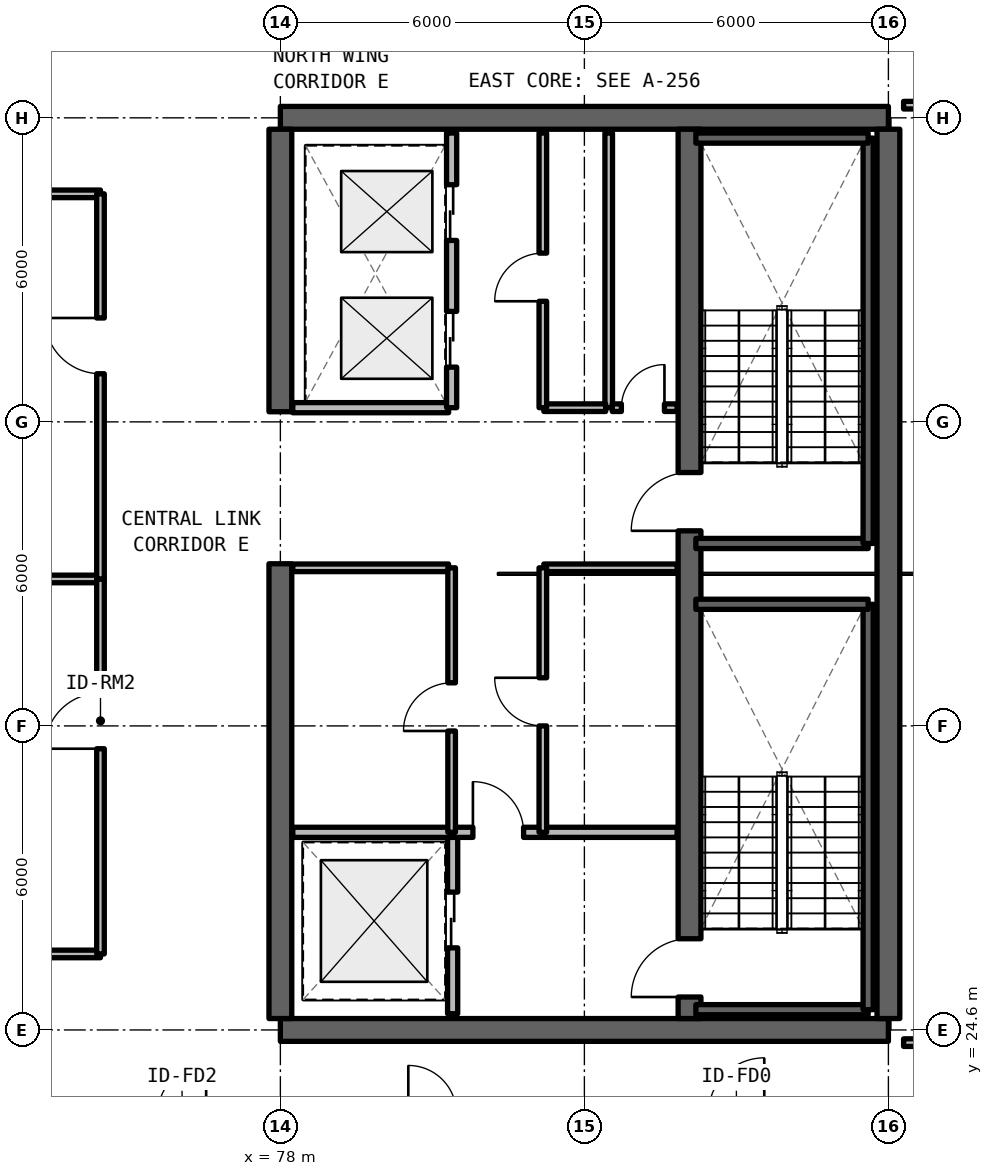
"""IFC4 building model, lengths in metres.
Left out: names, types, materials, properties, quantities, classifications, styles, units other than length and angle.
Written with IfcOpenShell. Run it as: python <this file> out.ifc"""

import sys

from ifc_helpers import new_model, si_unit, direction, frame, frame_2d, origin, place, context, subcontext, project, spatial, rectangle, extrude, element, fill, save


model = new_model("IFC4")
c1 = context("Model", 3, precision=1e-05, world=origin(), true_north=direction((0.0, 1.0)))
c2 = subcontext(c1, "Body", "Model", "MODEL_VIEW")
j1 = project(units=[si_unit("LENGTHUNIT", "METRE"), si_unit("PLANEANGLEUNIT", "RADIAN")], contexts=[c1])
p1 = place(None, origin())
s1 = spatial("IfcSite", under=j1, at=p1, CompositionType="ELEMENT")
p2 = place(p1, origin())
s2 = spatial("IfcBuilding", under=s1, at=p2, CompositionType="ELEMENT")
p3 = place(p2, frame((0.0, 0.0, 242.55)))
s3 = spatial("IfcBuildingStorey", under=s2, at=p3, CompositionType="ELEMENT", Elevation=242.55)
for number, where, z_axis, x_axis in (
    (1, (78.0, 24.6, 0.0), (0.0, 0.0, 1.0), (1.0, 0.0, 0.0)),
    (2, (90.0, 42.6, 0.0), (0.0, 0.0, 1.0), (-1.0, 0.0, 0.0)),
):
    element("IfcWall", number, at=place(p3, frame(where, z_axis=z_axis, x_axis=x_axis)), inside=s3, PredefinedType="SHEAR", context=c2, shape_type="SweptSolid", body=[
        extrude(rectangle(XDim=12.0, YDim=0.45, at=frame_2d((6.0, 0.0))), origin(), (0.0, 0.0, 1.0), 3.63),
    ])
p4 = place(p3, frame((90.0, 24.825, 0.0), z_axis=(0.0, 0.0, 1.0), x_axis=(0.0, 1.0, 0.0)))
e3 = element("IfcWall", 3, at=p4, inside=s3, PredefinedType="SHEAR", context=c2, shape_type="SweptSolid", body=[
    extrude(rectangle(XDim=17.55, YDim=0.45, at=frame_2d((8.775, 0.0))), origin(), (0.0, 0.0, 1.0), 3.63),
])
p5 = place(p3, frame((78.0, 24.825, 0.0), z_axis=(0.0, 0.0, 1.0), x_axis=(0.0, 1.0, 0.0)))
e4 = element("IfcWall", 4, at=p5, inside=s3, PredefinedType="SHEAR", context=c2, shape_type="SweptSolid", body=[
    extrude(rectangle(XDim=8.975, YDim=0.45, at=frame_2d((4.488, 0.0))), origin(), (0.0, 0.0, 1.0), 3.63),
])
p6 = place(p3, frame((78.0, 36.8, 0.0), z_axis=(0.0, 0.0, 1.0), x_axis=(0.0, 1.0, 0.0)))
e5 = element("IfcWall", 5, at=p6, inside=s3, PredefinedType="SHEAR", context=c2, shape_type="SweptSolid", body=[
    extrude(rectangle(XDim=5.575, YDim=0.45, at=frame_2d((2.788, 0.0))), origin(), (0.0, 0.0, 1.0), 3.63),
])
p7 = place(p3, frame((86.075, 24.825, 0.0), z_axis=(0.0, 0.0, 1.0), x_axis=(0.0, 1.0, 0.0)))
e6 = element("IfcWall", 6, at=p7, inside=s3, PredefinedType="SHEAR", context=c2, shape_type="SweptSolid", body=[
    extrude(rectangle(XDim=17.55, YDim=0.45, at=frame_2d((8.775, 0.0))), origin(), (0.0, 0.0, 1.0), 3.63),
])
p8 = place(p7, frame((0.425, 0.0, 0.0)))
e7 = element("IfcOpeningElement", 7, at=p8, cuts=e6, PredefinedType="OPENING", context=c2, shape_type="SweptSolid", body=[
    extrude(rectangle(XDim=1.15, YDim=2.15, at=frame_2d((0.575, 1.075))), frame((0.0, 0.235, 0.0), z_axis=(0.0, -1.0, 0.0), x_axis=(1.0, 0.0, 0.0)), (0.0, 0.0, 1.0), 0.47),
])
p9 = place(p7, frame((9.625, 0.0, 0.0)))
e8 = element("IfcOpeningElement", 8, at=p9, cuts=e6, PredefinedType="OPENING", context=c2, shape_type="SweptSolid", body=[
    extrude(rectangle(XDim=1.15, YDim=2.15, at=frame_2d((0.575, 1.075))), frame((0.0, 0.235, 0.0), z_axis=(0.0, -1.0, 0.0), x_axis=(1.0, 0.0, 0.0)), (0.0, 0.0, 1.0), 0.47),
])
p10 = place(p3, frame((81.4, 24.92, 0.0), z_axis=(0.0, 0.0, 1.0), x_axis=(0.0, 1.0, 0.0)))
e9 = element("IfcWall", 9, at=p10, inside=s3, PredefinedType="SOLIDWALL", context=c2, shape_type="SweptSolid", body=[
    extrude(rectangle(XDim=3.58, YDim=0.2, at=frame_2d((1.79, 0.0))), origin(), (0.0, 0.0, 1.0), 2.63),
])
p11 = place(p10, frame((1.3, 0.0, 0.0)))
e10 = element("IfcOpeningElement", 10, at=p11, cuts=e9, PredefinedType="OPENING", context=c2, shape_type="SweptSolid", body=[
    extrude(rectangle(XDim=1.1, YDim=2.2, at=frame_2d((0.55, 1.1))), frame((0.0, 0.11, 0.0), z_axis=(0.0, -1.0, 0.0), x_axis=(1.0, 0.0, 0.0)), (0.0, 0.0, 1.0), 0.22),
])
p12 = place(p3, frame((78.245, 28.5, 0.0), z_axis=(0.0, 0.0, 1.0), x_axis=(1.0, 0.0, 0.0)))
e11 = element("IfcWall", 11, at=p12, inside=s3, PredefinedType="SOLIDWALL", context=c2, shape_type="SweptSolid", body=[
    extrude(rectangle(XDim=7.585, YDim=0.2, at=frame_2d((3.792, 0.0))), origin(), (0.0, 0.0, 1.0), 2.63),
])
p13 = place(p12, frame((3.555, 0.0, 0.0)))
e12 = element("IfcOpeningElement", 12, at=p13, cuts=e11, PredefinedType="OPENING", context=c2, shape_type="SweptSolid", body=[
    extrude(rectangle(XDim=1.0, YDim=2.15, at=frame_2d((0.5, 1.075))), frame((0.0, 0.11, 0.0), z_axis=(0.0, -1.0, 0.0), x_axis=(1.0, 0.0, 0.0)), (0.0, 0.0, 1.0), 0.22),
])
p14 = place(p3, frame((83.2, 33.72, 0.0), z_axis=(0.0, 0.0, 1.0), x_axis=(1.0, 0.0, 0.0)))
e13 = element("IfcWall", 13, at=p14, inside=s3, PredefinedType="SOLIDWALL", context=c2, shape_type="SweptSolid", body=[
    extrude(rectangle(XDim=2.63, YDim=0.15, at=frame_2d((1.315, 0.0))), origin(), (0.0, 0.0, 1.0), 2.63),
])
p15 = place(p3, frame((83.18, 28.5, 0.0), z_axis=(0.0, 0.0, 1.0), x_axis=(0.0, 1.0, 0.0)))
e14 = element("IfcWall", 14, at=p15, inside=s3, PredefinedType="SOLIDWALL", context=c2, shape_type="SweptSolid", body=[
    extrude(rectangle(XDim=5.22, YDim=0.15, at=frame_2d((2.61, 0.0))), origin(), (0.0, 0.0, 1.0), 2.63),
])
p16 = place(p15, frame((2.1, 0.0, 0.0)))
e15 = element("IfcOpeningElement", 15, at=p16, cuts=e14, PredefinedType="OPENING", context=c2, shape_type="SweptSolid", body=[
    extrude(rectangle(XDim=0.95, YDim=2.15, at=frame_2d((0.475, 1.075))), frame((0.0, 0.085, 0.0), z_axis=(0.0, -1.0, 0.0), x_axis=(1.0, 0.0, 0.0)), (0.0, 0.0, 1.0), 0.17),
])
p17 = place(p3, frame((78.245, 33.72, 0.0), z_axis=(0.0, 0.0, 1.0), x_axis=(1.0, 0.0, 0.0)))
e16 = element("IfcWall", 16, at=p17, inside=s3, PredefinedType="SOLIDWALL", context=c2, shape_type="SweptSolid", body=[
    extrude(rectangle(XDim=3.075, YDim=0.15, at=frame_2d((1.538, 0.0))), origin(), (0.0, 0.0, 1.0), 2.63),
])
p18 = place(p3, frame((81.38, 28.5, 0.0), z_axis=(0.0, 0.0, 1.0), x_axis=(0.0, 1.0, 0.0)))
e17 = element("IfcWall", 17, at=p18, inside=s3, PredefinedType="SOLIDWALL", context=c2, shape_type="SweptSolid", body=[
    extrude(rectangle(XDim=5.22, YDim=0.15, at=frame_2d((2.61, 0.0))), origin(), (0.0, 0.0, 1.0), 2.63),
])
p19 = place(p18, frame((2.0, 0.0, 0.0)))
e18 = element("IfcOpeningElement", 18, at=p19, cuts=e17, PredefinedType="OPENING", context=c2, shape_type="SweptSolid", body=[
    extrude(rectangle(XDim=0.95, YDim=2.15, at=frame_2d((0.475, 1.075))), frame((0.0, 0.085, 0.0), z_axis=(0.0, -1.0, 0.0), x_axis=(1.0, 0.0, 0.0)), (0.0, 0.0, 1.0), 0.17),
])
p20 = place(p3, frame((84.48, 36.88, 0.0), z_axis=(0.0, 0.0, 1.0), x_axis=(0.0, 1.0, 0.0)))
e19 = element("IfcWall", 19, at=p20, inside=s3, PredefinedType="SOLIDWALL", context=c2, shape_type="SweptSolid", body=[
    extrude(rectangle(XDim=5.42, YDim=0.15, at=frame_2d((2.71, 0.0))), origin(), (0.0, 0.0, 1.0), 2.63),
])
p21 = place(p3, frame((84.55, 36.88, 0.0), z_axis=(0.0, 0.0, 1.0), x_axis=(1.0, 0.0, 0.0)))
e20 = element("IfcWall", 20, at=p21, inside=s3, PredefinedType="SOLIDWALL", context=c2, shape_type="SweptSolid", body=[
    extrude(rectangle(XDim=1.28, YDim=0.15, at=frame_2d((0.64, 0.0))), origin(), (0.0, 0.0, 1.0), 2.63),
])
p22 = place(p21, frame((0.18, 0.0, 0.0)))
e21 = element("IfcOpeningElement", 21, at=p22, cuts=e20, PredefinedType="OPENING", context=c2, shape_type="SweptSolid", body=[
    extrude(rectangle(XDim=0.85, YDim=2.1, at=frame_2d((0.425, 1.05))), frame((0.0, 0.085, 0.0), z_axis=(0.0, -1.0, 0.0), x_axis=(1.0, 0.0, 0.0)), (0.0, 0.0, 1.0), 0.17),
])
p23 = place(p3, frame((83.2, 36.88, 0.0), z_axis=(0.0, 0.0, 1.0), x_axis=(1.0, 0.0, 0.0)))
e22 = element("IfcWall", 22, at=p23, inside=s3, PredefinedType="SOLIDWALL", context=c2, shape_type="SweptSolid", body=[
    extrude(rectangle(XDim=1.22, YDim=0.15, at=frame_2d((0.61, 0.0))), origin(), (0.0, 0.0, 1.0), 2.63),
])
p24 = place(p3, frame((83.18, 36.88, 0.0), z_axis=(0.0, 0.0, 1.0), x_axis=(0.0, 1.0, 0.0)))
e23 = element("IfcWall", 23, at=p24, inside=s3, PredefinedType="SOLIDWALL", context=c2, shape_type="SweptSolid", body=[
    extrude(rectangle(XDim=5.42, YDim=0.15, at=frame_2d((2.71, 0.0))), origin(), (0.0, 0.0, 1.0), 2.63),
])
p25 = place(p24, frame((2.1, 0.0, 0.0)))
e24 = element("IfcOpeningElement", 24, at=p25, cuts=e23, PredefinedType="OPENING", context=c2, shape_type="SweptSolid", body=[
    extrude(rectangle(XDim=0.95, YDim=2.15, at=frame_2d((0.475, 1.075))), frame((0.0, 0.085, 0.0), z_axis=(0.0, -1.0, 0.0), x_axis=(1.0, 0.0, 0.0)), (0.0, 0.0, 1.0), 0.17),
])
p26 = place(p3, frame((78.245, 36.88, 0.0), z_axis=(0.0, 0.0, 1.0), x_axis=(1.0, 0.0, 0.0)))
e25 = element("IfcWall", 25, at=p26, inside=s3, PredefinedType="SOLIDWALL", context=c2, shape_type="SweptSolid", body=[
    extrude(rectangle(XDim=3.075, YDim=0.2, at=frame_2d((1.538, 0.0))), origin(), (0.0, 0.0, 1.0), 2.63),
])
p27 = place(p3, frame((81.38, 36.88, 0.0), z_axis=(0.0, 0.0, 1.0), x_axis=(0.0, 1.0, 0.0)))
e26 = element("IfcWall", 26, at=p27, inside=s3, PredefinedType="SOLIDWALL", context=c2, shape_type="SweptSolid", body=[
    extrude(rectangle(XDim=5.42, YDim=0.2, at=frame_2d((2.71, 0.0))), origin(), (0.0, 0.0, 1.0), 2.63),
])
p28 = place(p27, frame((0.8, 0.0, 0.0)))
e27 = element("IfcOpeningElement", 27, at=p28, cuts=e26, PredefinedType="OPENING", context=c2, shape_type="SweptSolid", body=[
    extrude(rectangle(XDim=1.1, YDim=2.2, at=frame_2d((0.55, 1.1))), frame((0.0, 0.11, 0.0), z_axis=(0.0, -1.0, 0.0), x_axis=(1.0, 0.0, 0.0)), (0.0, 0.0, 1.0), 0.22),
])
p29 = place(p27, frame((3.3, 0.0, 0.0)))
e28 = element("IfcOpeningElement", 28, at=p29, cuts=e26, PredefinedType="OPENING", context=c2, shape_type="SweptSolid", body=[
    extrude(rectangle(XDim=1.1, YDim=2.2, at=frame_2d((0.55, 1.1))), frame((0.0, 0.11, 0.0), z_axis=(0.0, -1.0, 0.0), x_axis=(1.0, 0.0, 0.0)), (0.0, 0.0, 1.0), 0.22),
])
p30 = place(p3, frame((90.3, 24.35, 0.0), z_axis=(0.0, 0.0, 1.0), x_axis=(1.0, 0.0, 0.0)))
e29 = element("IfcWall", 29, at=p30, inside=s3, PredefinedType="SOLIDWALL", context=c2, shape_type="SweptSolid", body=[
    extrude(rectangle(XDim=8.52, YDim=0.15, at=frame_2d((4.26, 0.0))), origin(), (0.0, 0.0, 1.0), 2.63),
])
p31 = place(p30, frame((0.975, 0.0, 0.0)))
e30 = element("IfcOpeningElement", 30, at=p31, cuts=e29, PredefinedType="OPENING", context=c2, shape_type="SweptSolid", body=[
    extrude(rectangle(XDim=0.95, YDim=2.15, at=frame_2d((0.475, 1.075))), frame((0.0, 0.085, 0.0), z_axis=(0.0, -1.0, 0.0), x_axis=(1.0, 0.0, 0.0)), (0.0, 0.0, 1.0), 0.17),
])
p32 = place(p3, frame((90.3, 42.85, 0.0), z_axis=(0.0, 0.0, 1.0), x_axis=(1.0, 0.0, 0.0)))
e31 = element("IfcWall", 31, at=p32, inside=s3, PredefinedType="SOLIDWALL", context=c2, shape_type="SweptSolid", body=[
    extrude(rectangle(XDim=8.52, YDim=0.15, at=frame_2d((4.26, 0.0))), origin(), (0.0, 0.0, 1.0), 2.63),
])
for number, where, z_axis, x_axis in (
    (32, (60.2, 26.1, 0.0), (0.0, 0.0, 1.0), (1.0, 0.0, 0.0)),
    (33, (60.2, 33.5, 0.0), (0.0, 0.0, 1.0), (1.0, 0.0, 0.0)),
):
    element("IfcWall", number, at=place(p3, frame(where, z_axis=z_axis, x_axis=x_axis)), inside=s3, PredefinedType="SOLIDWALL", context=c2, shape_type="SweptSolid", body=[
        extrude(rectangle(XDim=14.25, YDim=0.15, at=frame_2d((7.125, 0.0))), origin(), (0.0, 0.0, 1.0), 2.63),
    ])
p33 = place(p3, frame((74.45, 26.1, 0.0), z_axis=(0.0, 0.0, 1.0), x_axis=(0.0, 1.0, 0.0)))
e34 = element("IfcWall", 34, at=p33, inside=s3, PredefinedType="SOLIDWALL", context=c2, shape_type="SweptSolid", body=[
    extrude(rectangle(XDim=7.4, YDim=0.15, at=frame_2d((3.7, 0.0))), origin(), (0.0, 0.0, 1.0), 2.63),
])
p34 = place(p33, frame((4.05, 0.0, 0.0)))
e35 = element("IfcOpeningElement", 35, at=p34, cuts=e34, PredefinedType="OPENING", context=c2, shape_type="SweptSolid", body=[
    extrude(rectangle(XDim=1.1, YDim=2.15, at=frame_2d((0.55, 1.075))), frame((0.0, 0.085, 0.0), z_axis=(0.0, -1.0, 0.0), x_axis=(1.0, 0.0, 0.0)), (0.0, 0.0, 1.0), 0.17),
])
p35 = place(p3, frame((60.2, 41.1, 0.0), z_axis=(0.0, 0.0, 1.0), x_axis=(1.0, 0.0, 0.0)))
e36 = element("IfcWall", 36, at=p35, inside=s3, PredefinedType="SOLIDWALL", context=c2, shape_type="SweptSolid", body=[
    extrude(rectangle(XDim=14.25, YDim=0.15, at=frame_2d((7.125, 0.0))), origin(), (0.0, 0.0, 1.0), 2.63),
])
p36 = place(p3, frame((74.45, 33.5, 0.0), z_axis=(0.0, 0.0, 1.0), x_axis=(0.0, 1.0, 0.0)))
e37 = element("IfcWall", 37, at=p36, inside=s3, PredefinedType="SOLIDWALL", context=c2, shape_type="SweptSolid", body=[
    extrude(rectangle(XDim=7.6, YDim=0.15, at=frame_2d((3.8, 0.0))), origin(), (0.0, 0.0, 1.0), 2.63),
])
p37 = place(p36, frame((4.05, 0.0, 0.0)))
e38 = element("IfcOpeningElement", 38, at=p37, cuts=e37, PredefinedType="OPENING", context=c2, shape_type="SweptSolid", body=[
    extrude(rectangle(XDim=1.1, YDim=2.15, at=frame_2d((0.55, 1.075))), frame((0.0, 0.085, 0.0), z_axis=(0.0, -1.0, 0.0), x_axis=(1.0, 0.0, 0.0)), (0.0, 0.0, 1.0), 0.17),
])
p38 = place(p3, frame((86.2, 25.0, 0.0), z_axis=(0.0, 0.0, 1.0), x_axis=(1.0, 0.0, 0.0)))
e39 = element("IfcWall", 39, at=p38, inside=s3, PredefinedType="SOLIDWALL", context=c2, shape_type="SweptSolid", body=[
    extrude(rectangle(XDim=3.4, YDim=0.2, at=frame_2d((1.7, 0.0))), origin(), (0.0, 0.0, 1.0), 3.63),
])
p39 = place(p3, frame((89.6, 25.0, 0.0), z_axis=(0.0, 0.0, 1.0), x_axis=(0.0, 1.0, 0.0)))
e40 = element("IfcWall", 40, at=p39, inside=s3, PredefinedType="SOLIDWALL", context=c2, shape_type="SweptSolid", body=[
    extrude(rectangle(XDim=8.0, YDim=0.2, at=frame_2d((4.0, 0.0))), origin(), (0.0, 0.0, 1.0), 3.63),
])
for number, where, z_axis, x_axis in (
    (41, (89.6, 33.0, 0.0), (0.0, 0.0, 1.0), (-1.0, 0.0, 0.0)),
    (42, (86.2, 34.2, 0.0), (0.0, 0.0, 1.0), (1.0, 0.0, 0.0)),
):
    element("IfcWall", number, at=place(p3, frame(where, z_axis=z_axis, x_axis=x_axis)), inside=s3, PredefinedType="SOLIDWALL", context=c2, shape_type="SweptSolid", body=[
        extrude(rectangle(XDim=3.4, YDim=0.2, at=frame_2d((1.7, 0.0))), origin(), (0.0, 0.0, 1.0), 3.63),
    ])
p40 = place(p3, frame((89.6, 34.2, 0.0), z_axis=(0.0, 0.0, 1.0), x_axis=(0.0, 1.0, 0.0)))
e43 = element("IfcWall", 43, at=p40, inside=s3, PredefinedType="SOLIDWALL", context=c2, shape_type="SweptSolid", body=[
    extrude(rectangle(XDim=8.0, YDim=0.2, at=frame_2d((4.0, 0.0))), origin(), (0.0, 0.0, 1.0), 3.63),
])
p41 = place(p3, frame((89.6, 42.2, 0.0), z_axis=(0.0, 0.0, 1.0), x_axis=(-1.0, 0.0, 0.0)))
e44 = element("IfcWall", 44, at=p41, inside=s3, PredefinedType="SOLIDWALL", context=c2, shape_type="SweptSolid", body=[
    extrude(rectangle(XDim=3.4, YDim=0.2, at=frame_2d((1.7, 0.0))), origin(), (0.0, 0.0, 1.0), 3.63),
])
p42 = place(p11, origin())
e45 = element("IfcDoor", 45, at=p42, inside=s3, OperationType="SLIDING_TO_LEFT", PredefinedType="DOOR", context=c2, shape_type="SweptSolid", body=[
    extrude(rectangle(XDim=1.1, YDim=2.2, at=frame_2d((0.55, 1.1))), frame((0.0, 0.025, 0.0), z_axis=(0.0, -1.0, 0.0), x_axis=(1.0, 0.0, 0.0)), (0.0, 0.0, 1.0), 0.05),
])
fill(e10, e45)
p43 = place(p13, origin())
e46 = element("IfcDoor", 46, at=p43, inside=s3, OperationType="SINGLE_SWING_LEFT", PredefinedType="DOOR", context=c2, shape_type="SweptSolid", body=[
    extrude(rectangle(XDim=1.0, YDim=2.15, at=frame_2d((0.5, 1.075))), frame((0.0, 0.025, 0.0), z_axis=(0.0, -1.0, 0.0), x_axis=(1.0, 0.0, 0.0)), (0.0, 0.0, 1.0), 0.05),
])
fill(e12, e46)
p44 = place(p16, origin())
e47 = element("IfcDoor", 47, at=p44, inside=s3, OperationType="SINGLE_SWING_RIGHT", PredefinedType="DOOR", context=c2, shape_type="SweptSolid", body=[
    extrude(rectangle(XDim=0.95, YDim=2.15, at=frame_2d((0.475, 1.075))), frame((0.0, 0.025, 0.0), z_axis=(0.0, -1.0, 0.0), x_axis=(1.0, 0.0, 0.0)), (0.0, 0.0, 1.0), 0.05),
])
fill(e15, e47)
p45 = place(p19, origin())
e48 = element("IfcDoor", 48, at=p45, inside=s3, OperationType="SINGLE_SWING_LEFT", PredefinedType="DOOR", context=c2, shape_type="SweptSolid", body=[
    extrude(rectangle(XDim=0.95, YDim=2.15, at=frame_2d((0.475, 1.075))), frame((0.0, 0.025, 0.0), z_axis=(0.0, -1.0, 0.0), x_axis=(1.0, 0.0, 0.0)), (0.0, 0.0, 1.0), 0.05),
])
fill(e18, e48)
p46 = place(p22, origin())
e49 = element("IfcDoor", 49, at=p46, inside=s3, OperationType="SINGLE_SWING_RIGHT", PredefinedType="DOOR", context=c2, shape_type="SweptSolid", body=[
    extrude(rectangle(XDim=0.85, YDim=2.1, at=frame_2d((0.425, 1.05))), frame((0.0, 0.025, 0.0), z_axis=(0.0, -1.0, 0.0), x_axis=(1.0, 0.0, 0.0)), (0.0, 0.0, 1.0), 0.05),
])
fill(e21, e49)
p47 = place(p25, origin())
e50 = element("IfcDoor", 50, at=p47, inside=s3, OperationType="SINGLE_SWING_LEFT", PredefinedType="DOOR", context=c2, shape_type="SweptSolid", body=[
    extrude(rectangle(XDim=0.95, YDim=2.15, at=frame_2d((0.475, 1.075))), frame((0.0, 0.025, 0.0), z_axis=(0.0, -1.0, 0.0), x_axis=(1.0, 0.0, 0.0)), (0.0, 0.0, 1.0), 0.05),
])
fill(e24, e50)
p48 = place(p28, origin())
e51 = element("IfcDoor", 51, at=p48, inside=s3, OperationType="SLIDING_TO_LEFT", PredefinedType="DOOR", context=c2, shape_type="SweptSolid", body=[
    extrude(rectangle(XDim=1.1, YDim=2.2, at=frame_2d((0.55, 1.1))), frame((0.0, 0.025, 0.0), z_axis=(0.0, -1.0, 0.0), x_axis=(1.0, 0.0, 0.0)), (0.0, 0.0, 1.0), 0.05),
])
fill(e27, e51)
p49 = place(p29, origin())
e52 = element("IfcDoor", 52, at=p49, inside=s3, OperationType="SLIDING_TO_RIGHT", PredefinedType="DOOR", context=c2, shape_type="SweptSolid", body=[
    extrude(rectangle(XDim=1.1, YDim=2.2, at=frame_2d((0.55, 1.1))), frame((0.0, 0.025, 0.0), z_axis=(0.0, -1.0, 0.0), x_axis=(1.0, 0.0, 0.0)), (0.0, 0.0, 1.0), 0.05),
])
fill(e28, e52)
p50 = place(p34, origin())
e53 = element("IfcDoor", 53, at=p50, inside=s3, OperationType="SINGLE_SWING_LEFT", PredefinedType="DOOR", context=c2, shape_type="SweptSolid", body=[
    extrude(rectangle(XDim=1.1, YDim=2.15, at=frame_2d((0.55, 1.075))), frame((0.0, 0.025, 0.0), z_axis=(0.0, -1.0, 0.0), x_axis=(1.0, 0.0, 0.0)), (0.0, 0.0, 1.0), 0.05),
])
fill(e35, e53)
p51 = place(p37, origin())
e54 = element("IfcDoor", 54, at=p51, inside=s3, OperationType="SINGLE_SWING_RIGHT", PredefinedType="DOOR", context=c2, shape_type="SweptSolid", body=[
    extrude(rectangle(XDim=1.1, YDim=2.15, at=frame_2d((0.55, 1.075))), frame((0.0, 0.025, 0.0), z_axis=(0.0, -1.0, 0.0), x_axis=(1.0, 0.0, 0.0)), (0.0, 0.0, 1.0), 0.05),
])
fill(e38, e54)
p52 = place(p8, origin())
e55 = element("IfcDoor", 55, at=p52, inside=s3, OperationType="SINGLE_SWING_LEFT", PredefinedType="DOOR", context=c2, shape_type="SweptSolid", body=[
    extrude(rectangle(XDim=1.15, YDim=2.15, at=frame_2d((0.575, 1.075))), frame((0.0, 0.025, 0.0), z_axis=(0.0, -1.0, 0.0), x_axis=(1.0, 0.0, 0.0)), (0.0, 0.0, 1.0), 0.05),
])
fill(e7, e55)
p53 = place(p9, origin())
e56 = element("IfcDoor", 56, at=p53, inside=s3, OperationType="SINGLE_SWING_RIGHT", PredefinedType="DOOR", context=c2, shape_type="SweptSolid", body=[
    extrude(rectangle(XDim=1.15, YDim=2.15, at=frame_2d((0.575, 1.075))), frame((0.0, 0.025, 0.0), z_axis=(0.0, -1.0, 0.0), x_axis=(1.0, 0.0, 0.0)), (0.0, 0.0, 1.0), 0.05),
])
fill(e8, e56)
save(model, sys.argv[1])
